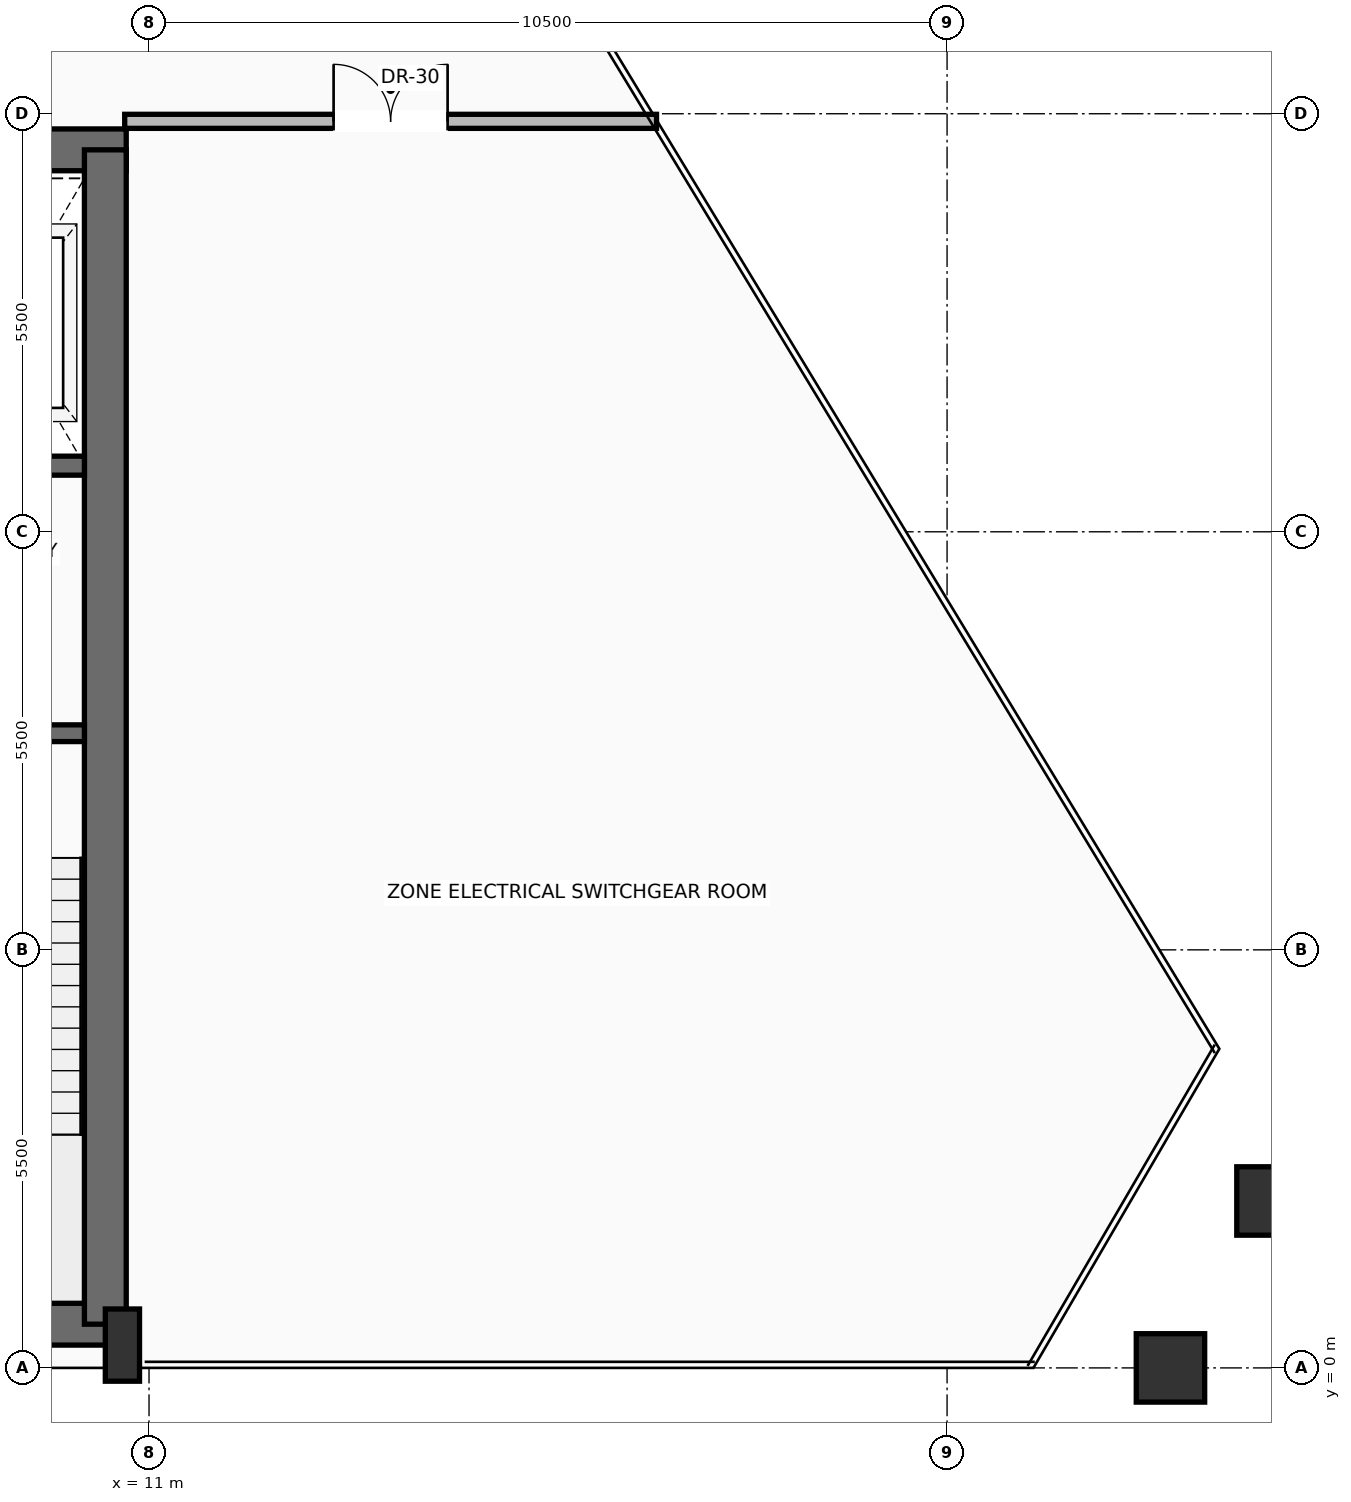
"""IFC4 building model, lengths in metres.
Left out: names, types, materials, properties, quantities, classifications, styles, units other than length and angle.
Written with IfcOpenShell. Run it as: python <this file> out.ifc"""

import sys

from ifc_helpers import new_model, si_unit, direction, frame, frame_2d, origin, origin_2d, place, context, subcontext, project, spatial, rectangle, hollow_rectangle, extrude, source, transform, mapped, element, fill, save


model = new_model("IFC4")
c1 = context("Model", 3, precision=1e-05, world=origin(), true_north=direction((0.0, 1.0)))
c2 = subcontext(c1, "Body", "Model", "MODEL_VIEW")
j1 = project(units=[si_unit("LENGTHUNIT", "METRE"), si_unit("PLANEANGLEUNIT", "RADIAN")], contexts=[c1])
p1 = place(None, origin())
s1 = spatial("IfcSite", under=j1, at=p1, CompositionType="ELEMENT")
p2 = place(p1, origin())
s2 = spatial("IfcBuilding", under=s1, at=p2, CompositionType="ELEMENT")
p3 = place(p2, frame((0.0, 0.0, 257.95)))
s3 = spatial("IfcBuildingStorey", under=s2, at=p3, CompositionType="ELEMENT", Elevation=257.95)
p4 = place(p3, frame((-10.65, 0.575, 0.0), z_axis=(0.0, 0.0, 1.0), x_axis=(1.0, 0.0, 0.0)))
e1 = element("IfcWall", 1, at=p4, inside=s3, PredefinedType="SHEAR", context=c2, shape_type="SweptSolid", body=[
    extrude(rectangle(XDim=21.3, YDim=0.55, at=frame_2d((10.65, 0.0))), origin(), (0.0, 0.0, 1.0), 4.49),
])
p5 = place(p3, frame((-10.7, 16.025, 0.0), z_axis=(0.0, 0.0, 1.0), x_axis=(1.0, 0.0, 0.0)))
e2 = element("IfcWall", 2, at=p5, inside=s3, PredefinedType="SHEAR", context=c2, shape_type="SweptSolid", body=[
    extrude(rectangle(XDim=21.4, YDim=0.55, at=frame_2d((10.7, 0.0))), origin(), (0.0, 0.0, 1.0), 4.49),
])
p6 = place(p5, frame((3.27, 0.0, 0.0)))
e3 = element("IfcOpeningElement", 3, at=p6, cuts=e2, PredefinedType="OPENING", context=c2, shape_type="SweptSolid", body=[
    extrude(rectangle(XDim=1.3, YDim=2.3, at=frame_2d((0.65, 1.15))), frame((0.0, 0.285, 0.0), z_axis=(0.0, -1.0, 0.0), x_axis=(1.0, 0.0, 0.0)), (0.0, 0.0, 1.0), 0.57),
])
p7 = place(p5, frame((9.7, 0.0, 0.0)))
e4 = element("IfcOpeningElement", 4, at=p7, cuts=e2, PredefinedType="OPENING", context=c2, shape_type="SweptSolid", body=[
    extrude(rectangle(XDim=2.0, YDim=2.4, at=frame_2d((1.0, 1.2))), frame((0.0, 0.285, 0.0), z_axis=(0.0, -1.0, 0.0), x_axis=(1.0, 0.0, 0.0)), (0.0, 0.0, 1.0), 0.57),
])
p8 = place(p3, frame((10.425, 0.575, 0.0), z_axis=(0.0, 0.0, 1.0), x_axis=(0.0, 1.0, 0.0)))
e5 = element("IfcWall", 5, at=p8, inside=s3, PredefinedType="SHEAR", context=c2, shape_type="SweptSolid", body=[
    extrude(rectangle(XDim=15.45, YDim=0.55, at=frame_2d((7.725, 0.0))), origin(), (0.0, 0.0, 1.0), 4.49),
])
m1 = source(origin(), c2, "Body", "SweptSolid", [
    extrude(rectangle(XDim=0.45, YDim=0.95, at=origin_2d()), origin(), (0.0, 0.0, 1.0), 4.7),
])
p9 = place(p3, frame((10.65, 0.3, 0.0), z_axis=(0.0, 0.0, 1.0), x_axis=(1.0, 0.0, 0.0)))
e6 = element("IfcColumn", 6, at=p9, inside=s3, PredefinedType="PILASTER", context=c2, shape_type="MappedRepresentation", body=[
    mapped(m1, transform((0.0, 0.0, 0.0), scale=1.0)),
])
m2 = source(origin(), c2, "Body", "SweptSolid", [
    extrude(hollow_rectangle(XDim=0.9, YDim=0.9, WallThickness=0.045, at=origin_2d()), origin(), (0.0, 0.0, 1.0), 4.691),
])
p10 = place(p3, frame((24.439, 0.0, 0.004), z_axis=(-0.000884725129, 0.0, 0.999999608631), x_axis=(1.0, 0.0, 0.0)))
e7 = element("IfcColumn", 7, at=p10, inside=s3, PredefinedType="COLUMN", context=c2, shape_type="MappedRepresentation", body=[
    mapped(m2, transform((0.0, 0.0, 0.0), scale=1.0)),
])
m3 = source(origin(), c2, "Body", "SweptSolid", [
    extrude(hollow_rectangle(XDim=0.9, YDim=0.9, WallThickness=0.045, at=origin_2d()), origin(), (0.0, 0.0, 1.0), 4.692),
])
p11 = place(p3, frame((25.762, 2.196, 0.004), z_axis=(-0.011135020873, -0.015974072, 0.999810402193), x_axis=(0.820360179664, -0.571847161069, 0.0)))
e8 = element("IfcColumn", 8, at=p11, inside=s3, PredefinedType="COLUMN", context=c2, shape_type="MappedRepresentation", body=[
    mapped(m3, transform((0.0, 0.0, 0.0), scale=1.0)),
])
p12 = place(p3, frame((10.15, 8.35, 0.0), z_axis=(0.0, 0.0, 1.0), x_axis=(-1.0, 0.0, 0.0)))
e9 = element("IfcWall", 9, at=p12, inside=s3, PredefinedType="SOLIDWALL", context=c2, shape_type="SweptSolid", body=[
    extrude(rectangle(XDim=4.65, YDim=0.22, at=frame_2d((2.325, 0.0))), origin(), (0.0, 0.0, 1.0), 4.49),
])
p13 = place(p12, frame((1.0, 0.0, 0.0)))
e10 = element("IfcOpeningElement", 10, at=p13, cuts=e9, PredefinedType="OPENING", context=c2, shape_type="SweptSolid", body=[
    extrude(rectangle(XDim=1.15, YDim=2.2, at=frame_2d((0.575, 1.1))), frame((0.0, 0.12, 0.0), z_axis=(0.0, -1.0, 0.0), x_axis=(1.0, 0.0, 0.0)), (0.0, 0.0, 1.0), 0.24),
])
p14 = place(p3, frame((10.15, 11.87, 0.0), z_axis=(0.0, 0.0, 1.0), x_axis=(-1.0, 0.0, 0.0)))
e11 = element("IfcWall", 11, at=p14, inside=s3, PredefinedType="SOLIDWALL", context=c2, shape_type="SweptSolid", body=[
    extrude(rectangle(XDim=4.65, YDim=0.25, at=frame_2d((2.325, 0.0))), origin(), (0.0, 0.0, 1.0), 4.49),
])
p15 = place(p14, frame((0.5, 0.0, 0.0)))
e12 = element("IfcOpeningElement", 12, at=p15, cuts=e11, PredefinedType="OPENING", context=c2, shape_type="SweptSolid", body=[
    extrude(rectangle(XDim=1.2, YDim=2.25, at=frame_2d((0.6, 1.125))), frame((0.0, 0.135, 0.0), z_axis=(0.0, -1.0, 0.0), x_axis=(1.0, 0.0, 0.0)), (0.0, 0.0, 1.0), 0.27),
])
p16 = place(p3, frame((10.68, 16.4, 0.0), z_axis=(0.0, 0.0, 1.0), x_axis=(1.0, 0.0, 0.0)))
e13 = element("IfcWall", 13, at=p16, inside=s3, PredefinedType="PARTITIONING", context=c2, shape_type="SweptSolid", body=[
    extrude(rectangle(XDim=6.997, YDim=0.185, at=frame_2d((3.499, 0.0))), origin(), (0.0, 0.0, 1.0), 4.482),
])
p17 = place(p16, frame((2.749, 0.0, 0.0)))
e14 = element("IfcOpeningElement", 14, at=p17, cuts=e13, PredefinedType="OPENING", context=c2, shape_type="SweptSolid", body=[
    extrude(rectangle(XDim=1.5, YDim=2.25, at=frame_2d((0.75, 1.125))), frame((0.0, 0.103, 0.0), z_axis=(0.0, -1.0, 0.0), x_axis=(1.0, 0.0, 0.0)), (0.0, 0.0, 1.0), 0.205),
])
m4 = source(origin(), c2, "Body", "SweptSolid", [
    extrude(rectangle(XDim=1.5, YDim=2.25, at=frame_2d((0.75, 1.125))), frame((0.0, 0.025, 0.0), z_axis=(0.0, -1.0, 0.0), x_axis=(1.0, 0.0, 0.0)), (0.0, 0.0, 1.0), 0.05),
])
p18 = place(p17, origin())
e15 = element("IfcDoor", 15, at=p18, inside=s3, OperationType="DOUBLE_DOOR_SINGLE_SWING", PredefinedType="DOOR", context=c2, shape_type="MappedRepresentation", body=[
    mapped(m4, transform((0.0, 0.0, 0.0), scale=1.0)),
])
fill(e14, e15)
save(model, sys.argv[1])
